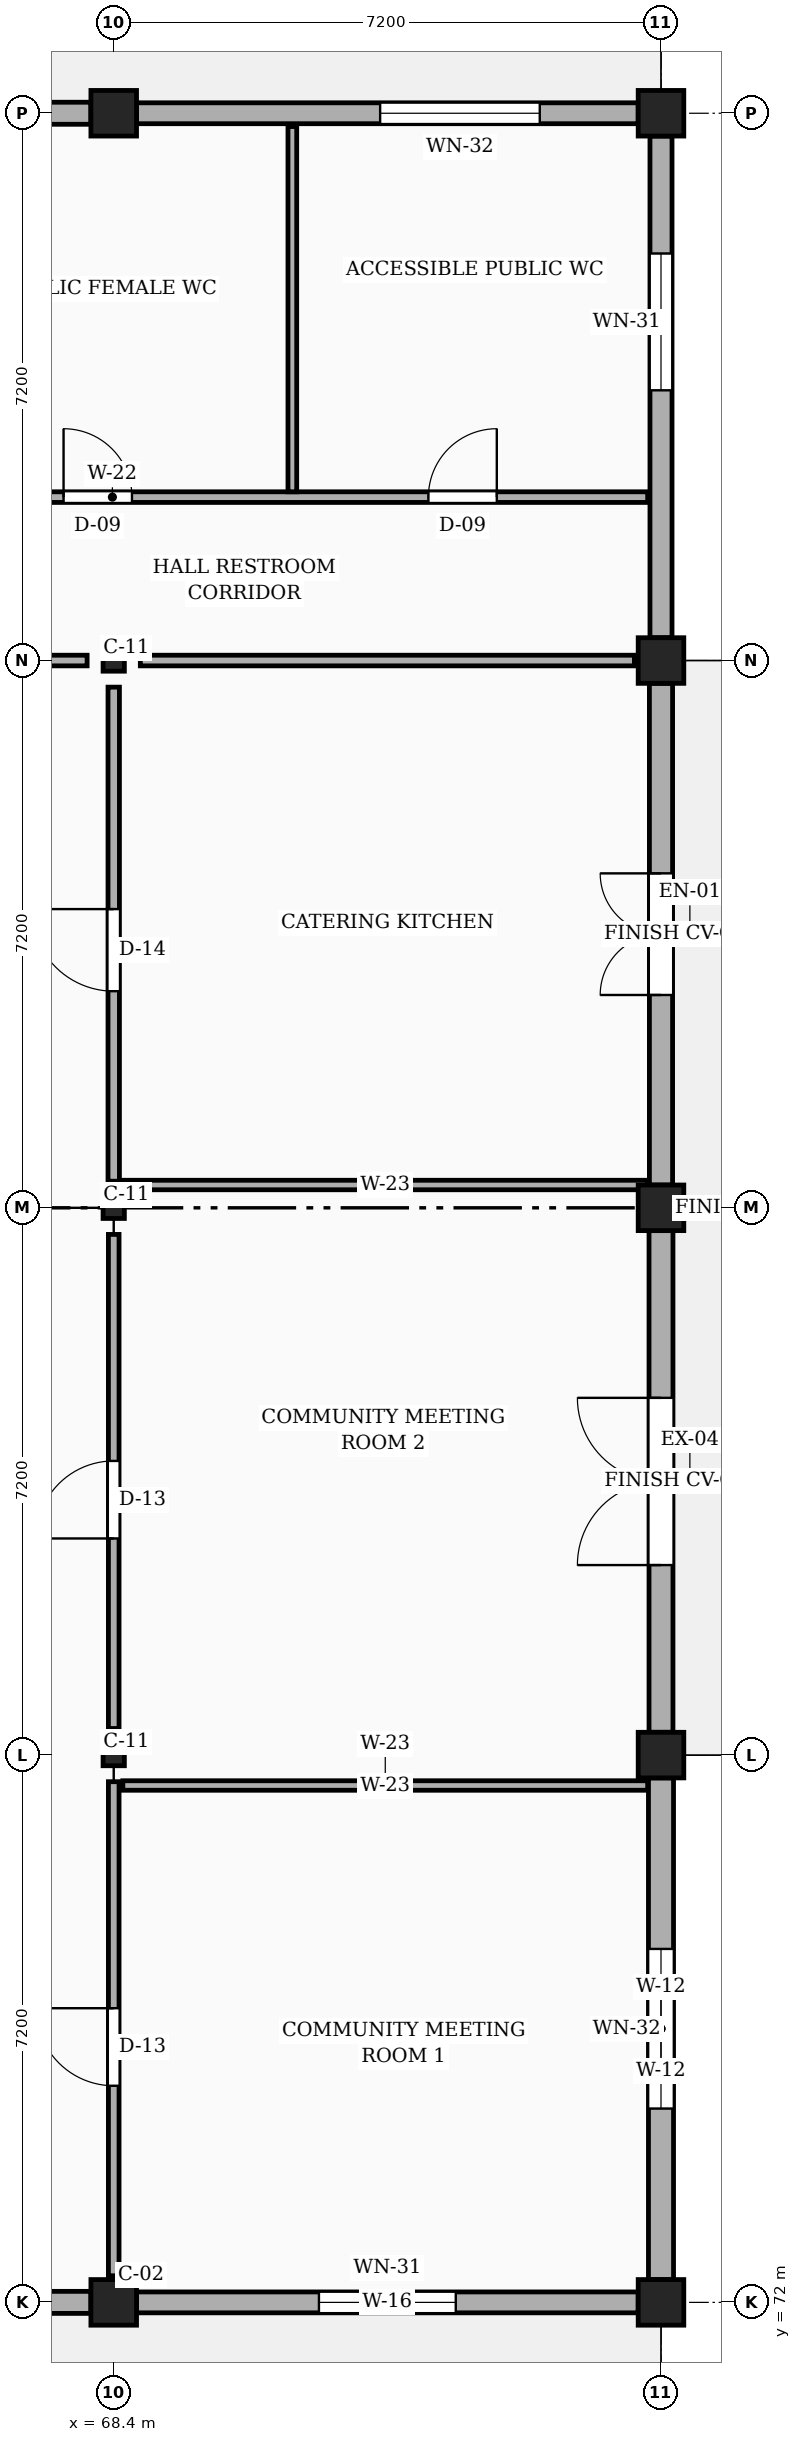
"""IFC4 building model, lengths in metres.
Left out: names, types, materials, properties, quantities, classifications, styles, units other than length and angle.
Written with IfcOpenShell. Run it as: python <this file> out.ifc"""

import sys

from ifc_helpers import new_model, si_unit, direction, frame, frame_2d, origin, origin_2d, place, context, subcontext, project, spatial, rectangle, i_section, extrude, element, fill, save


model = new_model("IFC4")
c1 = context("Model", 3, precision=1e-05, world=origin(), true_north=direction((0.0, 1.0)))
c2 = subcontext(c1, "Body", "Model", "MODEL_VIEW")
j1 = project(units=[si_unit("LENGTHUNIT", "METRE"), si_unit("PLANEANGLEUNIT", "RADIAN")], contexts=[c1])
p1 = place(None, origin())
s1 = spatial("IfcSite", under=j1, at=p1, CompositionType="ELEMENT")
p2 = place(p1, origin())
s2 = spatial("IfcBuilding", under=s1, at=p2, CompositionType="ELEMENT")
p3 = place(p2, origin())
s3 = spatial("IfcBuildingStorey", under=s2, at=p3, CompositionType="ELEMENT", Elevation=0.0)
p4 = place(p3, frame((68.4, 72.0, 0.0), z_axis=(0.0, 0.0, 1.0), x_axis=(1.0, 0.0, 0.0)))
e1 = element("IfcColumn", 1, at=p4, inside=s3, PredefinedType="COLUMN", context=c2, shape_type="SweptSolid", body=[
    extrude(rectangle(XDim=0.6, YDim=0.6, at=origin_2d()), origin(), (0.0, 0.0, 1.0), 8.1),
])
for number, where, z_axis, x_axis in (
    (2, (68.4, 79.2, 0.0), (0.0, 0.0, 1.0), (1.0, 0.0, 0.0)),
    (3, (68.4, 86.4, 0.0), (0.0, 0.0, 1.0), (1.0, 0.0, 0.0)),
    (4, (68.4, 93.6, 0.0), (0.0, 0.0, 1.0), (1.0, 0.0, 0.0)),
):
    element("IfcColumn", number, at=place(p3, frame(where, z_axis=z_axis, x_axis=x_axis)), inside=s3, PredefinedType="COLUMN", context=c2, shape_type="SweptSolid", body=[
        extrude(i_section(OverallWidth=0.28, OverallDepth=0.28, WebThickness=0.01, FlangeThickness=0.018, FilletRadius=0.024, at=origin_2d()), origin(), (0.0, 0.0, 1.0), 8.1),
    ])
p5 = place(p3, frame((68.4, 100.8, 0.0), z_axis=(0.0, 0.0, 1.0), x_axis=(1.0, 0.0, 0.0)))
e5 = element("IfcColumn", 5, at=p5, inside=s3, PredefinedType="COLUMN", context=c2, shape_type="SweptSolid", body=[
    extrude(rectangle(XDim=0.6, YDim=0.6, at=origin_2d()), origin(), (0.0, 0.0, 1.0), 8.1),
])
p6 = place(p3, frame((75.6, 72.0, 0.0), z_axis=(0.0, 0.0, 1.0), x_axis=(1.0, 0.0, 0.0)))
e6 = element("IfcColumn", 6, at=p6, inside=s3, PredefinedType="COLUMN", context=c2, shape_type="SweptSolid", body=[
    extrude(rectangle(XDim=0.6, YDim=0.6, at=origin_2d()), origin(), (0.0, 0.0, 1.0), 7.745),
])
p7 = place(p3, frame((75.6, 79.2, 0.0), z_axis=(0.0, 0.0, 1.0), x_axis=(1.0, 0.0, 0.0)))
e7 = element("IfcColumn", 7, at=p7, inside=s3, PredefinedType="COLUMN", context=c2, shape_type="SweptSolid", body=[
    extrude(rectangle(XDim=0.6, YDim=0.6, at=origin_2d()), origin(), (0.0, 0.0, 1.0), 9.295),
])
p8 = place(p3, frame((75.6, 86.4, 0.0), z_axis=(0.0, 0.0, 1.0), x_axis=(1.0, 0.0, 0.0)))
e8 = element("IfcColumn", 8, at=p8, inside=s3, PredefinedType="COLUMN", context=c2, shape_type="SweptSolid", body=[
    extrude(rectangle(XDim=0.6, YDim=0.6, at=origin_2d()), origin(), (0.0, 0.0, 1.0), 10.845),
])
p9 = place(p3, frame((75.6, 93.6, 0.0), z_axis=(0.0, 0.0, 1.0), x_axis=(1.0, 0.0, 0.0)))
e9 = element("IfcColumn", 9, at=p9, inside=s3, PredefinedType="COLUMN", context=c2, shape_type="SweptSolid", body=[
    extrude(rectangle(XDim=0.6, YDim=0.6, at=origin_2d()), origin(), (0.0, 0.0, 1.0), 9.295),
])
p10 = place(p3, frame((75.6, 100.8, 0.0), z_axis=(0.0, 0.0, 1.0), x_axis=(1.0, 0.0, 0.0)))
e10 = element("IfcColumn", 10, at=p10, inside=s3, PredefinedType="COLUMN", context=c2, shape_type="SweptSolid", body=[
    extrude(rectangle(XDim=0.6, YDim=0.6, at=origin_2d()), origin(), (0.0, 0.0, 1.0), 7.745),
])
p11 = place(p3, frame((61.5, 72.0, 0.0), z_axis=(0.0, 0.0, 1.0), x_axis=(1.0, 0.0, 0.0)))
e11 = element("IfcWall", 11, at=p11, inside=s3, PredefinedType="SOLIDWALL", context=c2, shape_type="SweptSolid", body=[
    extrude(rectangle(XDim=6.6, YDim=0.29, at=frame_2d((3.3, 0.0))), origin(), (0.0, 0.0, 1.0), 6.525),
])
p12 = place(p11, frame((2.3, 0.0, 0.0)))
e12 = element("IfcOpeningElement", 12, at=p12, cuts=e11, PredefinedType="OPENING", context=c2, shape_type="SweptSolid", body=[
    extrude(rectangle(XDim=2.0, YDim=2.3, at=frame_2d((1.0, 1.15))), frame((0.0, 0.155, 0.0), z_axis=(0.0, -1.0, 0.0), x_axis=(1.0, 0.0, 0.0)), (0.0, 0.0, 1.0), 0.31),
])
p13 = place(p3, frame((68.7, 72.0, 0.0), z_axis=(0.0, 0.0, 1.0), x_axis=(1.0, 0.0, 0.0)))
e13 = element("IfcWall", 13, at=p13, inside=s3, PredefinedType="SOLIDWALL", context=c2, shape_type="SweptSolid", body=[
    extrude(rectangle(XDim=6.6, YDim=0.275, at=frame_2d((3.3, 0.0))), origin(), (0.0, 0.0, 1.0), 6.525),
])
p14 = place(p13, frame((2.4, 0.0, 0.85)))
e14 = element("IfcOpeningElement", 14, at=p14, cuts=e13, PredefinedType="OPENING", context=c2, shape_type="SweptSolid", body=[
    extrude(rectangle(XDim=1.8, YDim=2.1, at=frame_2d((0.9, 1.05))), frame((0.0, 0.147, 0.0), z_axis=(0.0, -1.0, 0.0), x_axis=(1.0, 0.0, 0.0)), (0.0, 0.0, 1.0), 0.295),
])
p15 = place(p3, frame((75.6, 72.3, 0.0), z_axis=(0.0, 0.0, 1.0), x_axis=(0.0, 1.0, 0.0)))
e15 = element("IfcWall", 15, at=p15, inside=s3, PredefinedType="SOLIDWALL", context=c2, shape_type="SweptSolid", body=[
    extrude(rectangle(XDim=6.6, YDim=0.33, at=frame_2d((3.3, 0.0))), origin(), (0.0, 0.0, 1.0), 6.95),
])
p16 = place(p15, frame((2.25, 0.0, 0.85)))
e16 = element("IfcOpeningElement", 16, at=p16, cuts=e15, PredefinedType="OPENING", context=c2, shape_type="SweptSolid", body=[
    extrude(rectangle(XDim=2.1, YDim=2.1, at=frame_2d((1.05, 1.05))), frame((0.0, 0.175, 0.0), z_axis=(0.0, -1.0, 0.0), x_axis=(1.0, 0.0, 0.0)), (0.0, 0.0, 1.0), 0.35),
])
p17 = place(p3, frame((75.6, 79.5, 0.0), z_axis=(0.0, 0.0, 1.0), x_axis=(0.0, 1.0, 0.0)))
e17 = element("IfcWall", 17, at=p17, inside=s3, PredefinedType="SOLIDWALL", context=c2, shape_type="SweptSolid", body=[
    extrude(rectangle(XDim=6.6, YDim=0.315, at=frame_2d((3.3, 0.0))), origin(), (0.0, 0.0, 1.0), 6.95),
])
p18 = place(p17, frame((2.2, 0.0, 0.0)))
e18 = element("IfcOpeningElement", 18, at=p18, cuts=e17, PredefinedType="OPENING", context=c2, shape_type="SweptSolid", body=[
    extrude(rectangle(XDim=2.2, YDim=2.35, at=frame_2d((1.1, 1.175))), frame((0.0, 0.167, 0.0), z_axis=(0.0, -1.0, 0.0), x_axis=(1.0, 0.0, 0.0)), (0.0, 0.0, 1.0), 0.335),
])
p19 = place(p3, frame((75.6, 86.7, 0.0), z_axis=(0.0, 0.0, 1.0), x_axis=(0.0, 1.0, 0.0)))
e19 = element("IfcWall", 19, at=p19, inside=s3, PredefinedType="SOLIDWALL", context=c2, shape_type="SweptSolid", body=[
    extrude(rectangle(XDim=6.6, YDim=0.305, at=frame_2d((3.3, 0.0))), origin(), (0.0, 0.0, 1.0), 6.95),
])
p20 = place(p19, frame((2.5, 0.0, 0.0)))
e20 = element("IfcOpeningElement", 20, at=p20, cuts=e19, PredefinedType="OPENING", context=c2, shape_type="SweptSolid", body=[
    extrude(rectangle(XDim=1.6, YDim=2.25, at=frame_2d((0.8, 1.125))), frame((0.0, 0.163, 0.0), z_axis=(0.0, -1.0, 0.0), x_axis=(1.0, 0.0, 0.0)), (0.0, 0.0, 1.0), 0.325),
])
p21 = place(p3, frame((75.6, 93.9, 0.0), z_axis=(0.0, 0.0, 1.0), x_axis=(0.0, 1.0, 0.0)))
e21 = element("IfcWall", 21, at=p21, inside=s3, PredefinedType="SOLIDWALL", context=c2, shape_type="SweptSolid", body=[
    extrude(rectangle(XDim=6.6, YDim=0.29, at=frame_2d((3.3, 0.0))), origin(), (0.0, 0.0, 1.0), 6.95),
])
p22 = place(p21, frame((3.255, 0.0, 0.85)))
e22 = element("IfcOpeningElement", 22, at=p22, cuts=e21, PredefinedType="OPENING", context=c2, shape_type="SweptSolid", body=[
    extrude(rectangle(XDim=1.8, YDim=2.1, at=frame_2d((0.9, 1.05))), frame((0.0, 0.155, 0.0), z_axis=(0.0, -1.0, 0.0), x_axis=(1.0, 0.0, 0.0)), (0.0, 0.0, 1.0), 0.31),
])
p23 = place(p3, frame((75.3, 100.8, 0.0), z_axis=(0.0, 0.0, 1.0), x_axis=(-1.0, 0.0, 0.0)))
e23 = element("IfcWall", 23, at=p23, inside=s3, PredefinedType="SOLIDWALL", context=c2, shape_type="SweptSolid", body=[
    extrude(rectangle(XDim=6.6, YDim=0.275, at=frame_2d((3.3, 0.0))), origin(), (0.0, 0.0, 1.0), 6.525),
])
p24 = place(p23, frame((1.295, 0.0, 0.85)))
e24 = element("IfcOpeningElement", 24, at=p24, cuts=e23, PredefinedType="OPENING", context=c2, shape_type="SweptSolid", body=[
    extrude(rectangle(XDim=2.1, YDim=2.1, at=frame_2d((1.05, 1.05))), frame((0.0, 0.147, 0.0), z_axis=(0.0, -1.0, 0.0), x_axis=(1.0, 0.0, 0.0)), (0.0, 0.0, 1.0), 0.295),
])
p25 = place(p3, frame((68.1, 100.8, 0.0), z_axis=(0.0, 0.0, 1.0), x_axis=(-1.0, 0.0, 0.0)))
e25 = element("IfcWall", 25, at=p25, inside=s3, PredefinedType="SOLIDWALL", context=c2, shape_type="SweptSolid", body=[
    extrude(rectangle(XDim=6.6, YDim=0.29, at=frame_2d((3.3, 0.0))), origin(), (0.0, 0.0, 1.0), 6.525),
])
p26 = place(p25, frame((3.405, 0.0, 0.85)))
e26 = element("IfcOpeningElement", 26, at=p26, cuts=e25, PredefinedType="OPENING", context=c2, shape_type="SweptSolid", body=[
    extrude(rectangle(XDim=1.8, YDim=2.1, at=frame_2d((0.9, 1.05))), frame((0.0, 0.155, 0.0), z_axis=(0.0, -1.0, 0.0), x_axis=(1.0, 0.0, 0.0)), (0.0, 0.0, 1.0), 0.31),
])
p27 = place(p3, frame((68.4, 72.35, 0.0), z_axis=(0.0, 0.0, 1.0), x_axis=(0.0, 1.0, 0.0)))
e27 = element("IfcWall", 27, at=p27, inside=s3, PredefinedType="PARTITIONING", context=c2, shape_type="SweptSolid", body=[
    extrude(rectangle(XDim=6.5, YDim=0.14, at=frame_2d((3.25, 0.0))), origin(), (0.0, 0.0, 1.0), 4.1),
])
p28 = place(p27, frame((2.5, 0.0, 0.0)))
e28 = element("IfcOpeningElement", 28, at=p28, cuts=e27, PredefinedType="OPENING", context=c2, shape_type="SweptSolid", body=[
    extrude(rectangle(XDim=1.02, YDim=2.15, at=frame_2d((0.51, 1.075))), frame((0.0, 0.08, 0.0), z_axis=(0.0, -1.0, 0.0), x_axis=(1.0, 0.0, 0.0)), (0.0, 0.0, 1.0), 0.16),
])
p29 = place(p3, frame((68.4, 79.55, 0.0), z_axis=(0.0, 0.0, 1.0), x_axis=(0.0, 1.0, 0.0)))
e29 = element("IfcWall", 29, at=p29, inside=s3, PredefinedType="PARTITIONING", context=c2, shape_type="SweptSolid", body=[
    extrude(rectangle(XDim=6.5, YDim=0.14, at=frame_2d((3.25, 0.0))), origin(), (0.0, 0.0, 1.0), 4.1),
])
p30 = place(p29, frame((2.5, 0.0, 0.0)))
e30 = element("IfcOpeningElement", 30, at=p30, cuts=e29, PredefinedType="OPENING", context=c2, shape_type="SweptSolid", body=[
    extrude(rectangle(XDim=1.02, YDim=2.15, at=frame_2d((0.51, 1.075))), frame((0.0, 0.08, 0.0), z_axis=(0.0, -1.0, 0.0), x_axis=(1.0, 0.0, 0.0)), (0.0, 0.0, 1.0), 0.16),
])
p31 = place(p3, frame((68.4, 86.75, 0.0), z_axis=(0.0, 0.0, 1.0), x_axis=(0.0, 1.0, 0.0)))
e31 = element("IfcWall", 31, at=p31, inside=s3, PredefinedType="PARTITIONING", context=c2, shape_type="SweptSolid", body=[
    extrude(rectangle(XDim=6.5, YDim=0.15, at=frame_2d((3.25, 0.0))), origin(), (0.0, 0.0, 1.0), 4.1),
])
p32 = place(p31, frame((2.5, 0.0, 0.0)))
e32 = element("IfcOpeningElement", 32, at=p32, cuts=e31, PredefinedType="OPENING", context=c2, shape_type="SweptSolid", body=[
    extrude(rectangle(XDim=1.08, YDim=2.15, at=frame_2d((0.54, 1.075))), frame((0.0, 0.085, 0.0), z_axis=(0.0, -1.0, 0.0), x_axis=(1.0, 0.0, 0.0)), (0.0, 0.0, 1.0), 0.17),
])
for number, where, z_axis, x_axis in (
    (33, (68.52, 78.8, 0.0), (0.0, 0.0, 1.0), (1.0, 0.0, 0.0)),
    (34, (68.52, 86.7, 0.0), (0.0, 0.0, 1.0), (1.0, 0.0, 0.0)),
):
    element("IfcWall", number, at=place(p3, frame(where, z_axis=z_axis, x_axis=x_axis)), inside=s3, PredefinedType="PARTITIONING", context=c2, shape_type="SweptSolid", body=[
        extrude(rectangle(XDim=6.905, YDim=0.125, at=frame_2d((3.453, 0.0))), origin(), (0.0, 0.0, 1.0), 4.1),
    ])
p33 = place(p3, frame((61.55, 93.6, 0.0), z_axis=(0.0, 0.0, 1.0), x_axis=(1.0, 0.0, 0.0)))
e35 = element("IfcWall", 35, at=p33, inside=s3, PredefinedType="PARTITIONING", context=c2, shape_type="SweptSolid", body=[
    extrude(rectangle(XDim=6.5, YDim=0.14, at=frame_2d((3.25, 0.0))), origin(), (0.0, 0.0, 1.0), 4.1),
])
p34 = place(p33, frame((2.4, 0.0, 0.0)))
e36 = element("IfcOpeningElement", 36, at=p34, cuts=e35, PredefinedType="OPENING", context=c2, shape_type="SweptSolid", body=[
    extrude(rectangle(XDim=1.5, YDim=2.25, at=frame_2d((0.75, 1.125))), frame((0.0, 0.08, 0.0), z_axis=(0.0, -1.0, 0.0), x_axis=(1.0, 0.0, 0.0)), (0.0, 0.0, 1.0), 0.16),
])
p35 = place(p3, frame((68.75, 93.6, 0.0), z_axis=(0.0, 0.0, 1.0), x_axis=(1.0, 0.0, 0.0)))
e37 = element("IfcWall", 37, at=p35, inside=s3, PredefinedType="PARTITIONING", context=c2, shape_type="SweptSolid", body=[
    extrude(rectangle(XDim=6.5, YDim=0.14, at=frame_2d((3.25, 0.0))), origin(), (0.0, 0.0, 1.0), 4.1),
])
p36 = place(p3, frame((61.34, 95.75, 0.0), z_axis=(0.0, 0.0, 1.0), x_axis=(1.0, 0.0, 0.0)))
e38 = element("IfcWall", 38, at=p36, inside=s3, PredefinedType="PARTITIONING", context=c2, shape_type="SweptSolid", body=[
    extrude(rectangle(XDim=14.085, YDim=0.14, at=frame_2d((7.042, 0.0))), origin(), (0.0, 0.0, 1.0), 4.1),
])
p37 = place(p36, frame((1.6, 0.0, 0.0)))
e39 = element("IfcOpeningElement", 39, at=p37, cuts=e38, PredefinedType="OPENING", context=c2, shape_type="SweptSolid", body=[
    extrude(rectangle(XDim=0.9, YDim=2.05, at=frame_2d((0.45, 1.025))), frame((0.0, 0.08, 0.0), z_axis=(0.0, -1.0, 0.0), x_axis=(1.0, 0.0, 0.0)), (0.0, 0.0, 1.0), 0.16),
])
p38 = place(p36, frame((6.4, 0.0, 0.0)))
e40 = element("IfcOpeningElement", 40, at=p38, cuts=e38, PredefinedType="OPENING", context=c2, shape_type="SweptSolid", body=[
    extrude(rectangle(XDim=0.9, YDim=2.05, at=frame_2d((0.45, 1.025))), frame((0.0, 0.08, 0.0), z_axis=(0.0, -1.0, 0.0), x_axis=(1.0, 0.0, 0.0)), (0.0, 0.0, 1.0), 0.16),
])
p39 = place(p36, frame((11.2, 0.0, 0.0)))
e41 = element("IfcOpeningElement", 41, at=p39, cuts=e38, PredefinedType="OPENING", context=c2, shape_type="SweptSolid", body=[
    extrude(rectangle(XDim=0.9, YDim=2.05, at=frame_2d((0.45, 1.025))), frame((0.0, 0.08, 0.0), z_axis=(0.0, -1.0, 0.0), x_axis=(1.0, 0.0, 0.0)), (0.0, 0.0, 1.0), 0.16),
])
p40 = place(p3, frame((70.75, 95.82, 0.0), z_axis=(0.0, 0.0, 1.0), x_axis=(0.0, 1.0, 0.0)))
e42 = element("IfcWall", 42, at=p40, inside=s3, PredefinedType="PARTITIONING", context=c2, shape_type="SweptSolid", body=[
    extrude(rectangle(XDim=4.805, YDim=0.115, at=frame_2d((2.402, 0.0))), origin(), (0.0, 0.0, 1.0), 4.1),
])
p41 = place(p14, origin())
e43 = element("IfcWindow", 43, at=p41, inside=s3, PartitioningType="SINGLE_PANEL", PredefinedType="WINDOW", context=c2, shape_type="SweptSolid", body=[
    extrude(rectangle(XDim=1.8, YDim=2.1, at=frame_2d((0.9, 1.05))), frame((0.0, 0.03, 0.0), z_axis=(0.0, -1.0, 0.0), x_axis=(1.0, 0.0, 0.0)), (0.0, 0.0, 1.0), 0.06),
])
fill(e14, e43)
p42 = place(p16, origin())
e44 = element("IfcWindow", 44, at=p42, inside=s3, PartitioningType="SINGLE_PANEL", PredefinedType="WINDOW", context=c2, shape_type="SweptSolid", body=[
    extrude(rectangle(XDim=2.1, YDim=2.1, at=frame_2d((1.05, 1.05))), frame((0.0, 0.03, 0.0), z_axis=(0.0, -1.0, 0.0), x_axis=(1.0, 0.0, 0.0)), (0.0, 0.0, 1.0), 0.06),
])
fill(e16, e44)
p43 = place(p18, frame((2.2, 0.0, 0.0), z_axis=(0.0, 0.0, 1.0), x_axis=(-1.0, 0.0, 0.0)))
e45 = element("IfcDoor", 45, at=p43, inside=s3, OperationType="DOUBLE_DOOR_SINGLE_SWING", PredefinedType="DOOR", context=c2, shape_type="SweptSolid", body=[
    extrude(rectangle(XDim=2.2, YDim=2.35, at=frame_2d((1.1, 1.175))), frame((0.0, 0.025, 0.0), z_axis=(0.0, -1.0, 0.0), x_axis=(1.0, 0.0, 0.0)), (0.0, 0.0, 1.0), 0.05),
])
fill(e18, e45)
p44 = place(p20, frame((1.6, 0.0, 0.0), z_axis=(0.0, 0.0, 1.0), x_axis=(-1.0, 0.0, 0.0)))
e46 = element("IfcDoor", 46, at=p44, inside=s3, OperationType="DOUBLE_DOOR_SINGLE_SWING", PredefinedType="DOOR", context=c2, shape_type="SweptSolid", body=[
    extrude(rectangle(XDim=1.6, YDim=2.25, at=frame_2d((0.8, 1.125))), frame((0.0, 0.025, 0.0), z_axis=(0.0, -1.0, 0.0), x_axis=(1.0, 0.0, 0.0)), (0.0, 0.0, 1.0), 0.05),
])
fill(e20, e46)
p45 = place(p22, origin())
e47 = element("IfcWindow", 47, at=p45, inside=s3, PartitioningType="SINGLE_PANEL", PredefinedType="WINDOW", context=c2, shape_type="SweptSolid", body=[
    extrude(rectangle(XDim=1.8, YDim=2.1, at=frame_2d((0.9, 1.05))), frame((0.0, 0.03, 0.0), z_axis=(0.0, -1.0, 0.0), x_axis=(1.0, 0.0, 0.0)), (0.0, 0.0, 1.0), 0.06),
])
fill(e22, e47)
p46 = place(p24, origin())
e48 = element("IfcWindow", 48, at=p46, inside=s3, PartitioningType="SINGLE_PANEL", PredefinedType="WINDOW", context=c2, shape_type="SweptSolid", body=[
    extrude(rectangle(XDim=2.1, YDim=2.1, at=frame_2d((1.05, 1.05))), frame((0.0, 0.03, 0.0), z_axis=(0.0, -1.0, 0.0), x_axis=(1.0, 0.0, 0.0)), (0.0, 0.0, 1.0), 0.06),
])
fill(e24, e48)
p47 = place(p28, origin())
e49 = element("IfcDoor", 49, at=p47, inside=s3, OperationType="SINGLE_SWING_RIGHT", PredefinedType="DOOR", context=c2, shape_type="SweptSolid", body=[
    extrude(rectangle(XDim=1.02, YDim=2.15, at=frame_2d((0.51, 1.075))), frame((0.0, 0.025, 0.0), z_axis=(0.0, -1.0, 0.0), x_axis=(1.0, 0.0, 0.0)), (0.0, 0.0, 1.0), 0.05),
])
fill(e28, e49)
p48 = place(p30, origin())
e50 = element("IfcDoor", 50, at=p48, inside=s3, OperationType="SINGLE_SWING_LEFT", PredefinedType="DOOR", context=c2, shape_type="SweptSolid", body=[
    extrude(rectangle(XDim=1.02, YDim=2.15, at=frame_2d((0.51, 1.075))), frame((0.0, 0.025, 0.0), z_axis=(0.0, -1.0, 0.0), x_axis=(1.0, 0.0, 0.0)), (0.0, 0.0, 1.0), 0.05),
])
fill(e30, e50)
p49 = place(p32, origin())
e51 = element("IfcDoor", 51, at=p49, inside=s3, OperationType="SINGLE_SWING_RIGHT", PredefinedType="DOOR", context=c2, shape_type="SweptSolid", body=[
    extrude(rectangle(XDim=1.08, YDim=2.15, at=frame_2d((0.54, 1.075))), frame((0.0, 0.025, 0.0), z_axis=(0.0, -1.0, 0.0), x_axis=(1.0, 0.0, 0.0)), (0.0, 0.0, 1.0), 0.05),
])
fill(e32, e51)
p50 = place(p38, origin())
e52 = element("IfcDoor", 52, at=p50, inside=s3, OperationType="SINGLE_SWING_LEFT", PredefinedType="DOOR", context=c2, shape_type="SweptSolid", body=[
    extrude(rectangle(XDim=0.9, YDim=2.05, at=frame_2d((0.45, 1.025))), frame((0.0, 0.025, 0.0), z_axis=(0.0, -1.0, 0.0), x_axis=(1.0, 0.0, 0.0)), (0.0, 0.0, 1.0), 0.05),
])
fill(e40, e52)
p51 = place(p39, origin())
e53 = element("IfcDoor", 53, at=p51, inside=s3, OperationType="SINGLE_SWING_RIGHT", PredefinedType="DOOR", context=c2, shape_type="SweptSolid", body=[
    extrude(rectangle(XDim=0.9, YDim=2.05, at=frame_2d((0.45, 1.025))), frame((0.0, 0.025, 0.0), z_axis=(0.0, -1.0, 0.0), x_axis=(1.0, 0.0, 0.0)), (0.0, 0.0, 1.0), 0.05),
])
fill(e41, e53)
save(model, sys.argv[1])
